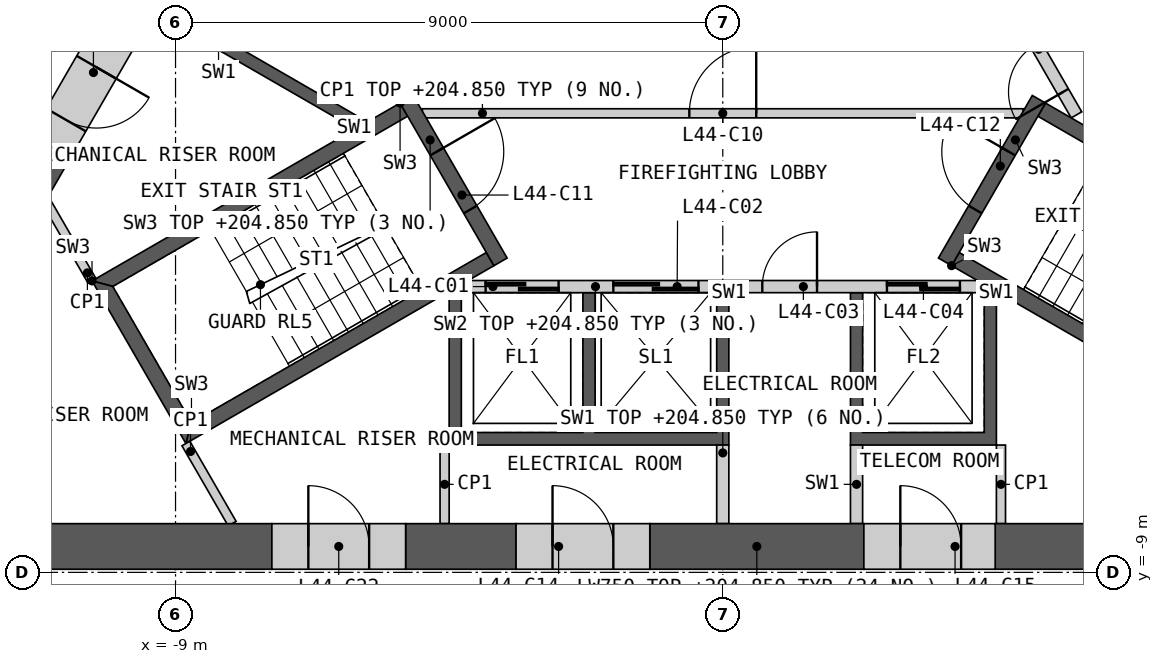
"""IFC4 building model, lengths in metres.
Left out: names, types, materials, properties, quantities, classifications, styles, units other than length and angle.
Written with IfcOpenShell. Run it as: python <this file> out.ifc"""

import sys

from ifc_helpers import new_model, si_unit, direction, frame, frame_2d, origin, place, context, subcontext, project, spatial, polyline, rectangle, outline, extrude, element, fill, save


model = new_model("IFC4")
c1 = context("Model", 3, precision=1e-05, world=origin(), true_north=direction((0.0, 1.0)))
c2 = subcontext(c1, "Body", "Model", "MODEL_VIEW")
j1 = project(units=[si_unit("LENGTHUNIT", "METRE"), si_unit("PLANEANGLEUNIT", "RADIAN")], contexts=[c1])
p1 = place(None, origin())
s1 = spatial("IfcSite", under=j1, at=p1, CompositionType="ELEMENT")
p2 = place(p1, origin())
s2 = spatial("IfcBuilding", under=s1, at=p2, CompositionType="ELEMENT")
p3 = place(p2, frame((0.0, 0.0, 201.6)))
s3 = spatial("IfcBuildingStorey", under=s2, at=p3, CompositionType="ELEMENT", Elevation=201.6)
p4 = place(p3, origin())
e1 = element("IfcWall", 1, at=p4, inside=s3, PredefinedType="SHEAR", context=c2, shape_type="SweptSolid", body=[
    extrude(outline(polyline([(4.5, -4.4), (4.5, -6.906), (2.1, -6.906), (2.1, -4.4), (2.3, -4.4), (2.3, -6.7), (4.3, -6.7), (4.3, -4.4), (4.5, -4.4)])), origin(), (0.0, 0.0, 1.0), 3.25),
])
p5 = place(p3, origin())
e2 = element("IfcWall", 2, at=p5, inside=s3, PredefinedType="SHEAR", context=c2, shape_type="SweptSolid", body=[
    extrude(outline(polyline([(0.1, -4.4), (0.1, -6.906), (-4.5, -6.906), (-4.5, -4.4), (-4.3, -4.4), (-4.3, -6.7), (-2.3, -6.7), (-2.3, -4.4), (-2.1, -4.4), (-2.1, -6.7), (-0.1, -6.7), (-0.1, -4.4), (0.1, -4.4)])), origin(), (0.0, 0.0, 1.0), 3.25),
])
p6 = place(p3, frame((-4.187, -4.3, 0.0), z_axis=(0.0, 0.0, 1.0), x_axis=(1.0, 0.0, 0.0)))
e3 = element("IfcWall", 3, at=p6, inside=s3, PredefinedType="SOLIDWALL", context=c2, shape_type="SweptSolid", body=[
    extrude(rectangle(XDim=8.373, YDim=0.2, at=frame_2d((4.187, 0.0))), origin(), (0.0, 0.0, 1.0), 3.25),
])
p7 = place(p6, frame((0.287, 0.0, 0.0)))
e4 = element("IfcOpeningElement", 4, at=p7, cuts=e3, PredefinedType="OPENING", context=c2, shape_type="SweptSolid", body=[
    extrude(rectangle(XDim=1.2, YDim=2.1, at=frame_2d((0.6, 1.05))), frame((0.0, 0.11, 0.0), z_axis=(0.0, -1.0, 0.0), x_axis=(1.0, 0.0, 0.0)), (0.0, 0.0, 1.0), 0.22),
])
p8 = place(p6, frame((2.387, 0.0, 0.0)))
e5 = element("IfcOpeningElement", 5, at=p8, cuts=e3, PredefinedType="OPENING", context=c2, shape_type="SweptSolid", body=[
    extrude(rectangle(XDim=1.4, YDim=2.1, at=frame_2d((0.7, 1.05))), frame((0.0, 0.11, 0.0), z_axis=(0.0, -1.0, 0.0), x_axis=(1.0, 0.0, 0.0)), (0.0, 0.0, 1.0), 0.22),
])
p9 = place(p6, frame((4.837, 0.0, 0.0)))
e6 = element("IfcOpeningElement", 6, at=p9, cuts=e3, PredefinedType="OPENING", context=c2, shape_type="SweptSolid", body=[
    extrude(rectangle(XDim=0.9, YDim=2.1, at=frame_2d((0.45, 1.05))), frame((0.0, 0.11, 0.0), z_axis=(0.0, -1.0, 0.0), x_axis=(1.0, 0.0, 0.0)), (0.0, 0.0, 1.0), 0.22),
])
p10 = place(p6, frame((6.887, 0.0, 0.0)))
e7 = element("IfcOpeningElement", 7, at=p10, cuts=e3, PredefinedType="OPENING", context=c2, shape_type="SweptSolid", body=[
    extrude(rectangle(XDim=1.2, YDim=2.1, at=frame_2d((0.6, 1.05))), frame((0.0, 0.11, 0.0), z_axis=(0.0, -1.0, 0.0), x_axis=(1.0, 0.0, 0.0)), (0.0, 0.0, 1.0), 0.22),
])
for number, where, z_axis, x_axis in (
    (8, (0.0, -6.906, 0.0), (0.0, 0.0, 1.0), (0.0, -1.0, 0.0)),
    (9, (2.2, -6.906, 0.0), (0.0, 0.0, 1.0), (0.0, -1.0, 0.0)),
):
    element("IfcWall", number, at=place(p3, frame(where, z_axis=z_axis, x_axis=x_axis)), inside=s3, PredefinedType="SHEAR", context=c2, shape_type="SweptSolid", body=[
        extrude(rectangle(XDim=1.293, YDim=0.2, at=frame_2d((0.646, 0.0))), origin(), (0.0, 0.0, 1.0), 3.25),
    ])
p11 = place(p3, frame((5.817, -1.476, 0.0), z_axis=(0.0, 0.0, 1.0), x_axis=(-0.500002616675, 0.866023893041, 0.0)))
e10 = element("IfcWall", 10, at=p11, inside=s3, PredefinedType="SOLIDWALL", context=c2, shape_type="SweptSolid", body=[
    extrude(rectangle(XDim=8.373, YDim=0.2, at=frame_2d((4.187, 0.0))), origin(), (0.0, 0.0, 1.0), 3.25),
])
p12 = place(p11, frame((0.437, 0.0, 0.0)))
e11 = element("IfcOpeningElement", 11, at=p12, cuts=e10, PredefinedType="OPENING", context=c2, shape_type="SweptSolid", body=[
    extrude(rectangle(XDim=0.9, YDim=2.1, at=frame_2d((0.45, 1.05))), frame((0.0, 0.11, 0.0), z_axis=(0.0, -1.0, 0.0), x_axis=(1.0, 0.0, 0.0)), (0.0, 0.0, 1.0), 0.22),
])
p13 = place(p11, frame((3.737, 0.0, 0.0)))
e12 = element("IfcOpeningElement", 12, at=p13, cuts=e10, PredefinedType="OPENING", context=c2, shape_type="SweptSolid", body=[
    extrude(rectangle(XDim=0.9, YDim=2.1, at=frame_2d((0.45, 1.05))), frame((0.0, 0.11, 0.0), z_axis=(0.0, -1.0, 0.0), x_axis=(1.0, 0.0, 0.0)), (0.0, 0.0, 1.0), 0.22),
])
p14 = place(p11, frame((6.937, 0.0, 0.0)))
e13 = element("IfcOpeningElement", 13, at=p14, cuts=e10, PredefinedType="OPENING", context=c2, shape_type="SweptSolid", body=[
    extrude(rectangle(XDim=1.1, YDim=2.1, at=frame_2d((0.55, 1.05))), frame((0.0, 0.11, 0.0), z_axis=(0.0, -1.0, 0.0), x_axis=(1.0, 0.0, 0.0)), (0.0, 0.0, 1.0), 0.22),
])
p15 = place(p3, origin())
e14 = element("IfcWall", 14, at=p15, inside=s3, PredefinedType="SHEAR", context=c2, shape_type="SweptSolid", body=[
    extrude(outline(polyline([(-6.061, -1.697), (-8.231, -0.444), (-8.131, -0.271), (-5.96, -1.524), (-6.061, -1.697)])), origin(), (0.0, 0.0, 1.0), 3.25),
])
p16 = place(p3, frame((-4.941, -1.45, 0.0), z_axis=(0.0, 0.0, 1.0), x_axis=(1.0, 0.0, 0.0)))
e15 = element("IfcWall", 15, at=p16, inside=s3, PredefinedType="PARTITIONING", context=c2, shape_type="SweptSolid", body=[
    extrude(rectangle(XDim=9.882, YDim=0.15, at=frame_2d((4.941, 0.0))), origin(), (0.0, 0.0, 1.0), 3.25),
])
p17 = place(p16, frame((4.391, 0.0, 0.0)))
e16 = element("IfcOpeningElement", 16, at=p17, cuts=e15, PredefinedType="OPENING", context=c2, shape_type="SweptSolid", body=[
    extrude(rectangle(XDim=1.1, YDim=2.1, at=frame_2d((0.55, 1.05))), frame((0.0, 0.085, 0.0), z_axis=(0.0, -1.0, 0.0), x_axis=(1.0, 0.0, 0.0)), (0.0, 0.0, 1.0), 0.17),
])
p18 = place(p3, origin())
e17 = element("IfcWall", 17, at=p18, inside=s3, PredefinedType="SHEAR", context=c2, shape_type="SweptSolid", body=[
    extrude(outline(polyline([(-5.307, -1.281), (-10.374, -4.206), (-10.032, -4.298), (-5.182, -1.498), (-5.307, -1.281)])), origin(), (0.0, 0.0, 1.0), 3.25),
])
p19 = place(p3, origin())
e18 = element("IfcWall", 18, at=p19, inside=s3, PredefinedType="SHEAR", context=c2, shape_type="SweptSolid", body=[
    extrude(outline(polyline([(-10.374, -4.206), (-8.83, -6.881), (-8.738, -6.539), (-10.032, -4.298), (-10.374, -4.206)])), origin(), (0.0, 0.0, 1.0), 3.25),
])
p20 = place(p3, origin())
e19 = element("IfcWall", 19, at=p20, inside=s3, PredefinedType="SHEAR", context=c2, shape_type="SweptSolid", body=[
    extrude(outline(polyline([(-8.738, -6.539), (-8.83, -6.881), (-3.763, -3.956), (-3.888, -3.739), (-8.738, -6.539)])), origin(), (0.0, 0.0, 1.0), 3.25),
])
p21 = place(p3, frame((-5.199, -1.219, 0.0), z_axis=(0.0, 0.0, 1.0), x_axis=(0.499982516597, -0.866035497597, 0.0)))
e20 = element("IfcWall", 20, at=p21, inside=s3, PredefinedType="SHEAR", context=c2, shape_type="SweptSolid", body=[
    extrude(rectangle(XDim=3.088, YDim=0.25, at=frame_2d((1.544, 0.0))), origin(), (0.0, 0.0, 1.0), 3.25),
])
p22 = place(p21, frame((0.994, 0.0, 0.0)))
e21 = element("IfcOpeningElement", 21, at=p22, cuts=e20, PredefinedType="OPENING", context=c2, shape_type="SweptSolid", body=[
    extrude(rectangle(XDim=1.1, YDim=2.1, at=frame_2d((0.55, 1.05))), frame((0.0, 0.135, 0.0), z_axis=(0.0, -1.0, 0.0), x_axis=(1.0, 0.0, 0.0)), (0.0, 0.0, 1.0), 0.27),
])
p23 = place(p3, origin())
e22 = element("IfcWall", 22, at=p23, inside=s3, PredefinedType="SHEAR", context=c2, shape_type="SweptSolid", body=[
    extrude(outline(polyline([(3.763, -3.956), (8.83, -6.881), (8.738, -6.539), (3.888, -3.739), (3.763, -3.956)])), origin(), (0.0, 0.0, 1.0), 3.25),
])
p24 = place(p3, origin())
e23 = element("IfcWall", 23, at=p24, inside=s3, PredefinedType="SHEAR", context=c2, shape_type="SweptSolid", body=[
    extrude(outline(polyline([(10.032, -4.298), (10.374, -4.206), (5.307, -1.281), (5.182, -1.498), (10.032, -4.298)])), origin(), (0.0, 0.0, 1.0), 3.25),
])
p25 = place(p3, frame((3.655, -3.893, 0.0), z_axis=(0.0, 0.0, 1.0), x_axis=(0.499982516597, 0.866035497597, 0.0)))
e24 = element("IfcWall", 24, at=p25, inside=s3, PredefinedType="SHEAR", context=c2, shape_type="SweptSolid", body=[
    extrude(rectangle(XDim=3.088, YDim=0.25, at=frame_2d((1.544, 0.0))), origin(), (0.0, 0.0, 1.0), 3.25),
])
p26 = place(p25, frame((0.994, 0.0, 0.0)))
e25 = element("IfcOpeningElement", 25, at=p26, cuts=e24, PredefinedType="OPENING", context=c2, shape_type="SweptSolid", body=[
    extrude(rectangle(XDim=1.1, YDim=2.1, at=frame_2d((0.55, 1.05))), frame((0.0, 0.135, 0.0), z_axis=(0.0, -1.0, 0.0), x_axis=(1.0, 0.0, 0.0)), (0.0, 0.0, 1.0), 0.27),
])
for number, where, z_axis, x_axis in (
    (26, (4.575, -6.906, 0.0), (0.0, 0.0, 1.0), (0.0, -1.0, 0.0)),
    (27, (-4.575, -6.906, 0.0), (0.0, 0.0, 1.0), (0.0, -1.0, 0.0)),
):
    element("IfcWall", number, at=place(p3, frame(where, z_axis=z_axis, x_axis=x_axis)), inside=s3, PredefinedType="PARTITIONING", context=c2, shape_type="SweptSolid", body=[
        extrude(rectangle(XDim=1.293, YDim=0.15, at=frame_2d((0.646, 0.0))), origin(), (0.0, 0.0, 1.0), 3.25),
    ])
for number, where, z_axis, x_axis in (
    (28, (-8.83, -6.881, 0.0), (0.0, 0.0, 1.0), (0.5, -0.866, 0.0)),
    (29, (-10.374, -4.206, 0.0), (0.0, 0.0, 1.0), (-0.5, 0.866, 0.0)),
):
    element("IfcWall", number, at=place(p3, frame(where, z_axis=z_axis, x_axis=x_axis)), inside=s3, PredefinedType="PARTITIONING", context=c2, shape_type="SweptSolid", body=[
        extrude(rectangle(XDim=1.522, YDim=0.15, at=frame_2d((0.761, 0.0))), origin(), (0.0, 0.0, 1.0), 3.25),
    ])
p27 = place(p3, frame((-14.201, -8.574, 0.0), z_axis=(0.0, 0.0, 1.0), x_axis=(1.0, 0.0, 0.0)))
e30 = element("IfcWall", 30, at=p27, inside=s3, PredefinedType="SHEAR", context=c2, shape_type="SweptSolid", body=[
    extrude(rectangle(XDim=6.785, YDim=0.75, at=frame_2d((3.393, 0.0))), origin(), (0.0, 0.0, 1.0), 3.25),
])
p28 = place(p3, frame((4.48, -8.574, 0.0), z_axis=(0.0, 0.0, 1.0), x_axis=(1.0, 0.0, 0.0)))
e31 = element("IfcWall", 31, at=p28, inside=s3, PredefinedType="SHEAR", context=c2, shape_type="SweptSolid", body=[
    extrude(rectangle(XDim=3.845, YDim=0.75, at=frame_2d((1.923, 0.0))), origin(), (0.0, 0.0, 1.0), 3.25),
])
p29 = place(p3, frame((-1.2, -8.574, 0.0), z_axis=(0.0, 0.0, 1.0), x_axis=(1.0, 0.0, 0.0)))
e32 = element("IfcWall", 32, at=p29, inside=s3, PredefinedType="SHEAR", context=c2, shape_type="SweptSolid", body=[
    extrude(rectangle(XDim=3.52, YDim=0.75, at=frame_2d((1.76, 0.0))), origin(), (0.0, 0.0, 1.0), 3.25),
])
p30 = place(p3, frame((-5.216, -8.574, 0.0), z_axis=(0.0, 0.0, 1.0), x_axis=(1.0, 0.0, 0.0)))
e33 = element("IfcWall", 33, at=p30, inside=s3, PredefinedType="SHEAR", context=c2, shape_type="SweptSolid", body=[
    extrude(rectangle(XDim=1.816, YDim=0.75, at=frame_2d((0.908, 0.0))), origin(), (0.0, 0.0, 1.0), 3.25),
])
p31 = place(p3, frame((-11.096, -2.07, 0.0), z_axis=(0.0, 0.0, 1.0), x_axis=(-0.49992834617, -0.86606676919, 0.0)))
e34 = element("IfcWall", 34, at=p31, inside=s3, PredefinedType="SHEAR", context=c2, shape_type="SweptSolid", body=[
    extrude(rectangle(XDim=2.737, YDim=0.75, at=frame_2d((1.369, 0.0))), origin(), (0.0, 0.0, 1.0), 3.25),
])
p32 = place(p3, frame((-3.4, -8.574, 0.0), z_axis=(0.0, 0.0, 1.0), x_axis=(1.0, 0.0, 0.0)))
e35 = element("IfcWall", 35, at=p32, inside=s3, PredefinedType="SHEAR", context=c2, shape_type="SweptSolid", body=[
    extrude(rectangle(XDim=2.2, YDim=0.75, at=frame_2d((1.1, 0.0))), origin(), (0.0, 0.0, 1.0), 3.25),
])
p33 = place(p32, frame((0.6, 0.0, 0.0)))
e36 = element("IfcOpeningElement", 36, at=p33, cuts=e35, PredefinedType="OPENING", context=c2, shape_type="SweptSolid", body=[
    extrude(rectangle(XDim=1.0, YDim=2.1, at=frame_2d((0.5, 1.05))), frame((0.0, 0.385, 0.0), z_axis=(0.0, -1.0, 0.0), x_axis=(1.0, 0.0, 0.0)), (0.0, 0.0, 1.0), 0.77),
])
p34 = place(p3, frame((2.32, -8.574, 0.0), z_axis=(0.0, 0.0, 1.0), x_axis=(1.0, 0.0, 0.0)))
e37 = element("IfcWall", 37, at=p34, inside=s3, PredefinedType="SHEAR", context=c2, shape_type="SweptSolid", body=[
    extrude(rectangle(XDim=2.16, YDim=0.75, at=frame_2d((1.08, 0.0))), origin(), (0.0, 0.0, 1.0), 3.25),
])
p35 = place(p34, frame((0.6, 0.0, 0.0)))
e38 = element("IfcOpeningElement", 38, at=p35, cuts=e37, PredefinedType="OPENING", context=c2, shape_type="SweptSolid", body=[
    extrude(rectangle(XDim=1.0, YDim=2.1, at=frame_2d((0.5, 1.05))), frame((0.0, 0.385, 0.0), z_axis=(0.0, -1.0, 0.0), x_axis=(1.0, 0.0, 0.0)), (0.0, 0.0, 1.0), 0.77),
])
p36 = place(p3, frame((-9.625, 0.477, 0.0), z_axis=(0.0, 0.0, 1.0), x_axis=(-0.500005104963, -0.866022456413, 0.0)))
e39 = element("IfcWall", 39, at=p36, inside=s3, PredefinedType="SHEAR", context=c2, shape_type="SweptSolid", body=[
    extrude(rectangle(XDim=2.941, YDim=0.75, at=frame_2d((1.47, 0.0))), origin(), (0.0, 0.0, 1.0), 3.25),
])
p37 = place(p36, frame((1.35, 0.0, 0.0)))
e40 = element("IfcOpeningElement", 40, at=p37, cuts=e39, PredefinedType="OPENING", context=c2, shape_type="SweptSolid", body=[
    extrude(rectangle(XDim=1.0, YDim=2.1, at=frame_2d((0.5, 1.05))), frame((0.0, 0.385, 0.0), z_axis=(0.0, -1.0, 0.0), x_axis=(1.0, 0.0, 0.0)), (0.0, 0.0, 1.0), 0.77),
])
p38 = place(p3, frame((-7.416, -8.574, 0.0), z_axis=(0.0, 0.0, 1.0), x_axis=(1.0, 0.0, 0.0)))
e41 = element("IfcWall", 41, at=p38, inside=s3, PredefinedType="SHEAR", context=c2, shape_type="SweptSolid", body=[
    extrude(rectangle(XDim=2.2, YDim=0.75, at=frame_2d((1.1, 0.0))), origin(), (0.0, 0.0, 1.0), 3.25),
])
p39 = place(p38, frame((0.6, 0.0, 0.0)))
e42 = element("IfcOpeningElement", 42, at=p39, cuts=e41, PredefinedType="OPENING", context=c2, shape_type="SweptSolid", body=[
    extrude(rectangle(XDim=1.0, YDim=2.1, at=frame_2d((0.5, 1.05))), frame((0.0, 0.385, 0.0), z_axis=(0.0, -1.0, 0.0), x_axis=(1.0, 0.0, 0.0)), (0.0, 0.0, 1.0), 0.77),
])
p40 = place(p3, frame((-14.619, -2.624, 0.0), z_axis=(0.0, 0.0, 1.0), x_axis=(0.50000393355, 0.866023132736, 0.0)))
e43 = element("IfcWall", 43, at=p40, inside=s3, PredefinedType="PARTITIONING", context=c2, shape_type="SweptSolid", body=[
    extrude(rectangle(XDim=9.335, YDim=0.2, at=frame_2d((4.667, 0.0))), origin(), (0.0, 0.0, 1.0), 3.25),
])
p41 = place(p40, frame((3.163, 0.0, 0.0)))
e44 = element("IfcOpeningElement", 44, at=p41, cuts=e43, PredefinedType="OPENING", context=c2, shape_type="SweptSolid", body=[
    extrude(rectangle(XDim=1.0, YDim=2.1, at=frame_2d((0.5, 1.05))), frame((0.0, 0.11, 0.0), z_axis=(0.0, -1.0, 0.0), x_axis=(1.0, 0.0, 0.0)), (0.0, 0.0, 1.0), 0.22),
])
p42 = place(p7, origin())
e45 = element("IfcDoor", 45, at=p42, inside=s3, OperationType="SLIDING_TO_LEFT", PredefinedType="DOOR", context=c2, shape_type="SweptSolid", body=[
    extrude(rectangle(XDim=1.2, YDim=2.1, at=frame_2d((0.6, 1.05))), frame((0.0, 0.025, 0.0), z_axis=(0.0, -1.0, 0.0), x_axis=(1.0, 0.0, 0.0)), (0.0, 0.0, 1.0), 0.05),
])
fill(e4, e45)
p43 = place(p8, origin())
e46 = element("IfcDoor", 46, at=p43, inside=s3, OperationType="SLIDING_TO_LEFT", PredefinedType="DOOR", context=c2, shape_type="SweptSolid", body=[
    extrude(rectangle(XDim=1.4, YDim=2.1, at=frame_2d((0.7, 1.05))), frame((0.0, 0.025, 0.0), z_axis=(0.0, -1.0, 0.0), x_axis=(1.0, 0.0, 0.0)), (0.0, 0.0, 1.0), 0.05),
])
fill(e5, e46)
p44 = place(p9, origin())
e47 = element("IfcDoor", 47, at=p44, inside=s3, OperationType="SINGLE_SWING_RIGHT", PredefinedType="DOOR", context=c2, shape_type="SweptSolid", body=[
    extrude(rectangle(XDim=0.9, YDim=2.1, at=frame_2d((0.45, 1.05))), frame((0.0, 0.025, 0.0), z_axis=(0.0, -1.0, 0.0), x_axis=(1.0, 0.0, 0.0)), (0.0, 0.0, 1.0), 0.05),
])
fill(e6, e47)
p45 = place(p10, origin())
e48 = element("IfcDoor", 48, at=p45, inside=s3, OperationType="SLIDING_TO_LEFT", PredefinedType="DOOR", context=c2, shape_type="SweptSolid", body=[
    extrude(rectangle(XDim=1.2, YDim=2.1, at=frame_2d((0.6, 1.05))), frame((0.0, 0.025, 0.0), z_axis=(0.0, -1.0, 0.0), x_axis=(1.0, 0.0, 0.0)), (0.0, 0.0, 1.0), 0.05),
])
fill(e7, e48)
p46 = place(p12, origin())
e49 = element("IfcDoor", 49, at=p46, inside=s3, OperationType="SINGLE_SWING_LEFT", PredefinedType="DOOR", context=c2, shape_type="SweptSolid", body=[
    extrude(rectangle(XDim=0.9, YDim=2.1, at=frame_2d((0.45, 1.05))), frame((0.0, 0.025, 0.0), z_axis=(0.0, -1.0, 0.0), x_axis=(1.0, 0.0, 0.0)), (0.0, 0.0, 1.0), 0.05),
])
fill(e11, e49)
p47 = place(p17, origin())
e50 = element("IfcDoor", 50, at=p47, inside=s3, OperationType="SINGLE_SWING_RIGHT", PredefinedType="DOOR", context=c2, shape_type="SweptSolid", body=[
    extrude(rectangle(XDim=1.1, YDim=2.1, at=frame_2d((0.55, 1.05))), frame((0.0, 0.025, 0.0), z_axis=(0.0, -1.0, 0.0), x_axis=(1.0, 0.0, 0.0)), (0.0, 0.0, 1.0), 0.05),
])
fill(e16, e50)
p48 = place(p22, origin())
e51 = element("IfcDoor", 51, at=p48, inside=s3, OperationType="SINGLE_SWING_LEFT", PredefinedType="DOOR", context=c2, shape_type="SweptSolid", body=[
    extrude(rectangle(XDim=1.1, YDim=2.1, at=frame_2d((0.55, 1.05))), frame((0.0, 0.025, 0.0), z_axis=(0.0, -1.0, 0.0), x_axis=(1.0, 0.0, 0.0)), (0.0, 0.0, 1.0), 0.05),
])
fill(e21, e51)
p49 = place(p26, origin())
e52 = element("IfcDoor", 52, at=p49, inside=s3, OperationType="SINGLE_SWING_RIGHT", PredefinedType="DOOR", context=c2, shape_type="SweptSolid", body=[
    extrude(rectangle(XDim=1.1, YDim=2.1, at=frame_2d((0.55, 1.05))), frame((0.0, 0.025, 0.0), z_axis=(0.0, -1.0, 0.0), x_axis=(1.0, 0.0, 0.0)), (0.0, 0.0, 1.0), 0.05),
])
fill(e25, e52)
p50 = place(p33, origin())
e53 = element("IfcDoor", 53, at=p50, inside=s3, OperationType="SINGLE_SWING_LEFT", PredefinedType="DOOR", context=c2, shape_type="SweptSolid", body=[
    extrude(rectangle(XDim=1.0, YDim=2.1, at=frame_2d((0.5, 1.05))), frame((0.0, 0.13, 0.0), z_axis=(0.0, -1.0, 0.0), x_axis=(1.0, 0.0, 0.0)), (0.0, 0.0, 1.0), 0.05),
])
fill(e36, e53)
p51 = place(p35, origin())
e54 = element("IfcDoor", 54, at=p51, inside=s3, OperationType="SINGLE_SWING_LEFT", PredefinedType="DOOR", context=c2, shape_type="SweptSolid", body=[
    extrude(rectangle(XDim=1.0, YDim=2.1, at=frame_2d((0.5, 1.05))), frame((0.0, 0.13, 0.0), z_axis=(0.0, -1.0, 0.0), x_axis=(1.0, 0.0, 0.0)), (0.0, 0.0, 1.0), 0.05),
])
fill(e38, e54)
p52 = place(p37, origin())
e55 = element("IfcDoor", 55, at=p52, inside=s3, OperationType="SINGLE_SWING_LEFT", PredefinedType="DOOR", context=c2, shape_type="SweptSolid", body=[
    extrude(rectangle(XDim=1.0, YDim=2.1, at=frame_2d((0.5, 1.05))), frame((0.0, 0.13, 0.0), z_axis=(0.0, -1.0, 0.0), x_axis=(1.0, 0.0, 0.0)), (0.0, 0.0, 1.0), 0.05),
])
fill(e40, e55)
p53 = place(p39, origin())
e56 = element("IfcDoor", 56, at=p53, inside=s3, OperationType="SINGLE_SWING_LEFT", PredefinedType="DOOR", context=c2, shape_type="SweptSolid", body=[
    extrude(rectangle(XDim=1.0, YDim=2.1, at=frame_2d((0.5, 1.05))), frame((0.0, 0.13, 0.0), z_axis=(0.0, -1.0, 0.0), x_axis=(1.0, 0.0, 0.0)), (0.0, 0.0, 1.0), 0.05),
])
fill(e42, e56)
save(model, sys.argv[1])
